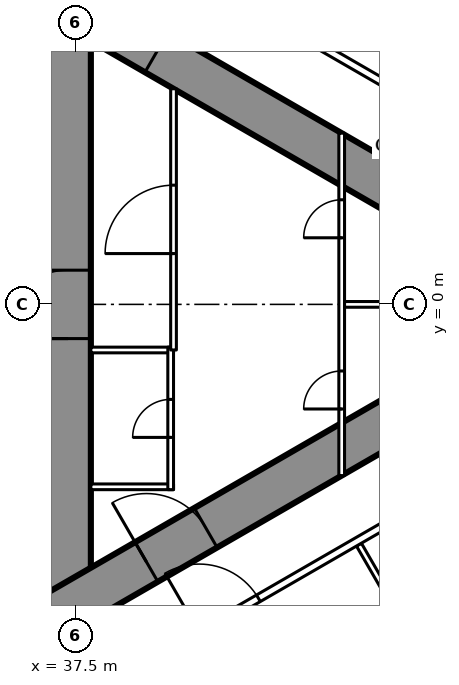
"""IFC4 building model, lengths in metres.
Left out: names, types, materials, properties, quantities, classifications, styles, units other than length and angle.
Written with IfcOpenShell. Run it as: python <this file> out.ifc"""

import sys

from ifc_helpers import new_model, si_unit, direction, frame, frame_2d, origin, place, context, subcontext, project, spatial, rectangle, extrude, element, fill, save


model = new_model("IFC4")
c1 = context("Model", 3, precision=1e-05, world=origin(), true_north=direction((0.0, 1.0)))
c2 = subcontext(c1, "Body", "Model", "MODEL_VIEW")
j1 = project(units=[si_unit("LENGTHUNIT", "METRE"), si_unit("PLANEANGLEUNIT", "RADIAN")], contexts=[c1])
p1 = place(None, origin())
s1 = spatial("IfcSite", under=j1, at=p1, CompositionType="ELEMENT")
p2 = place(p1, origin())
s2 = spatial("IfcBuilding", under=s1, at=p2, CompositionType="ELEMENT")
p3 = place(p2, frame((0.0, 0.0, 143.1)))
s3 = spatial("IfcBuildingStorey", under=s2, at=p3, CompositionType="ELEMENT", Elevation=143.1)
p4 = place(p3, frame((37.3, -8.6, 0.0), z_axis=(0.0, 0.0, 1.0), x_axis=(0.0, 1.0, 0.0)))
e1 = element("IfcWall", 1, at=p4, inside=s3, PredefinedType="SHEAR", context=c2, shape_type="SweptSolid", body=[
    extrude(rectangle(XDim=17.2, YDim=1.2, at=frame_2d((8.6, 0.0))), origin(), (0.0, 0.0, 1.0), 3.6),
])
p5 = place(p4, frame((7.7, 0.0, 0.0)))
e2 = element("IfcOpeningElement", 2, at=p5, cuts=e1, PredefinedType="OPENING", context=c2, shape_type="SweptSolid", body=[
    extrude(rectangle(XDim=1.8, YDim=2.2, at=frame_2d((0.9, 1.1))), frame((0.0, 0.61, 0.0), z_axis=(0.0, -1.0, 0.0), x_axis=(1.0, 0.0, 0.0)), (0.0, 0.0, 1.0), 1.22),
])
p6 = place(p3, frame((27.2, -13.8, 0.0), z_axis=(0.0, 0.0, 1.0), x_axis=(0.866027159892, 0.499996958321, 0.0)))
e3 = element("IfcWall", 3, at=p6, inside=s3, PredefinedType="SHEAR", context=c2, shape_type="SweptSolid", body=[
    extrude(rectangle(XDim=27.947, YDim=1.2, at=frame_2d((13.973, 0.0))), origin(), (0.0, 0.0, 1.0), 3.6),
])
p7 = place(p6, frame((4.6, 0.0, 0.0)))
e4 = element("IfcOpeningElement", 4, at=p7, cuts=e3, PredefinedType="OPENING", context=c2, shape_type="SweptSolid", body=[
    extrude(rectangle(XDim=1.0, YDim=2.2, at=frame_2d((0.5, 1.1))), frame((0.0, 0.61, 0.0), z_axis=(0.0, -1.0, 0.0), x_axis=(1.0, 0.0, 0.0)), (0.0, 0.0, 1.0), 1.22),
])
p8 = place(p6, frame((14.045, 0.0, 0.0)))
e5 = element("IfcOpeningElement", 5, at=p8, cuts=e3, PredefinedType="OPENING", context=c2, shape_type="SweptSolid", body=[
    extrude(rectangle(XDim=1.8, YDim=2.2, at=frame_2d((0.9, 1.1))), frame((0.0, 0.61, 0.0), z_axis=(0.0, -1.0, 0.0), x_axis=(1.0, 0.0, 0.0)), (0.0, 0.0, 1.0), 1.22),
])
p9 = place(p3, frame((27.2, 13.8, 0.0), z_axis=(0.0, 0.0, 1.0), x_axis=(0.866024515034, -0.500001539357, 0.0)))
e6 = element("IfcWall", 6, at=p9, inside=s3, PredefinedType="SHEAR", context=c2, shape_type="SweptSolid", body=[
    extrude(rectangle(XDim=26.907, YDim=1.2, at=frame_2d((13.454, 0.0))), origin(), (0.0, 0.0, 1.0), 3.6),
])
p10 = place(p9, frame((4.5, 0.0, 0.0)))
e7 = element("IfcOpeningElement", 7, at=p10, cuts=e6, PredefinedType="OPENING", context=c2, shape_type="SweptSolid", body=[
    extrude(rectangle(XDim=1.0, YDim=2.2, at=frame_2d((0.5, 1.1))), frame((0.0, 0.61, 0.0), z_axis=(0.0, -1.0, 0.0), x_axis=(1.0, 0.0, 0.0)), (0.0, 0.0, 1.0), 1.22),
])
p11 = place(p9, frame((12.545, 0.0, 0.0)))
e8 = element("IfcOpeningElement", 8, at=p11, cuts=e6, PredefinedType="OPENING", context=c2, shape_type="SweptSolid", body=[
    extrude(rectangle(XDim=1.8, YDim=2.2, at=frame_2d((0.9, 1.1))), frame((0.0, 0.61, 0.0), z_axis=(0.0, -1.0, 0.0), x_axis=(1.0, 0.0, 0.0)), (0.0, 0.0, 1.0), 1.22),
])
p12 = place(p3, frame((44.954, -6.321, 0.0), z_axis=(0.0, 0.0, 1.0), x_axis=(0.500018676722, -0.866014620505, 0.0)))
e9 = element("IfcWall", 9, at=p12, inside=s3, PredefinedType="PARTITIONING", context=c2, shape_type="SweptSolid", body=[
    extrude(rectangle(XDim=8.704, YDim=0.15, at=frame_2d((4.352, 0.0))), origin(), (0.0, 0.0, 1.0), 2.15),
])
p13 = place(p3, frame((37.96, -10.243, 0.0), z_axis=(0.0, 0.0, 1.0), x_axis=(0.866026429433, 0.499998223521, 0.0)))
e10 = element("IfcWall", 10, at=p13, inside=s3, PredefinedType="PARTITIONING", context=c2, shape_type="SweptSolid", body=[
    extrude(rectangle(XDim=20.487, YDim=0.2, at=frame_2d((10.243, 0.0))), origin(), (0.0, 0.0, 1.0), 3.35),
])
p14 = place(p13, frame((11.464, 0.0, 0.0)))
e11 = element("IfcOpeningElement", 11, at=p14, cuts=e10, PredefinedType="OPENING", context=c2, shape_type="SweptSolid", body=[
    extrude(rectangle(XDim=1.8, YDim=2.2, at=frame_2d((0.9, 1.1))), frame((0.0, 0.11, 0.0), z_axis=(0.0, -1.0, 0.0), x_axis=(1.0, 0.0, 0.0)), (0.0, 0.0, 1.0), 0.22),
])
p15 = place(p13, frame((17.586, 0.0, 0.0)))
e12 = element("IfcOpeningElement", 12, at=p15, cuts=e10, PredefinedType="OPENING", context=c2, shape_type="SweptSolid", body=[
    extrude(rectangle(XDim=1.8, YDim=2.14, at=frame_2d((0.9, 1.07))), frame((0.0, 0.11, 0.0), z_axis=(0.0, -1.0, 0.0), x_axis=(1.0, 0.0, 0.0)), (0.0, 0.0, 1.0), 0.22),
])
p16 = place(p13, frame((3.221, 0.0, 0.0)))
e13 = element("IfcOpeningElement", 13, at=p16, cuts=e10, PredefinedType="OPENING", context=c2, shape_type="SweptSolid", body=[
    extrude(rectangle(XDim=1.8, YDim=2.2, at=frame_2d((0.9, 1.1))), frame((0.0, 0.11, 0.0), z_axis=(0.0, -1.0, 0.0), x_axis=(1.0, 0.0, 0.0)), (0.0, 0.0, 1.0), 0.22),
])
p17 = place(p3, frame((36.834, 10.894, 0.0), z_axis=(0.0, 0.0, 1.0), x_axis=(0.866028157229, -0.499995230863, 0.0)))
e14 = element("IfcWall", 14, at=p17, inside=s3, PredefinedType="PARTITIONING", context=c2, shape_type="SweptSolid", body=[
    extrude(rectangle(XDim=21.667, YDim=0.2, at=frame_2d((10.833, 0.0))), origin(), (0.0, 0.0, 1.0), 3.35),
])
p18 = place(p17, frame((18.826, 0.0, 0.0)))
e15 = element("IfcOpeningElement", 15, at=p18, cuts=e14, PredefinedType="OPENING", context=c2, shape_type="SweptSolid", body=[
    extrude(rectangle(XDim=1.8, YDim=2.2, at=frame_2d((0.9, 1.1))), frame((0.0, 0.11, 0.0), z_axis=(0.0, -1.0, 0.0), x_axis=(1.0, 0.0, 0.0)), (0.0, 0.0, 1.0), 0.22),
])
p19 = place(p17, frame((14.938, 0.0, 0.0)))
e16 = element("IfcOpeningElement", 16, at=p19, cuts=e14, PredefinedType="OPENING", context=c2, shape_type="SweptSolid", body=[
    extrude(rectangle(XDim=1.8, YDim=2.2, at=frame_2d((0.9, 1.1))), frame((0.0, 0.11, 0.0), z_axis=(0.0, -1.0, 0.0), x_axis=(1.0, 0.0, 0.0)), (0.0, 0.0, 1.0), 0.22),
])
p20 = place(p17, frame((6.248, 0.0, 0.0)))
e17 = element("IfcOpeningElement", 17, at=p20, cuts=e14, PredefinedType="OPENING", context=c2, shape_type="SweptSolid", body=[
    extrude(rectangle(XDim=1.8, YDim=2.2, at=frame_2d((0.9, 1.1))), frame((0.0, 0.11, 0.0), z_axis=(0.0, -1.0, 0.0), x_axis=(1.0, 0.0, 0.0)), (0.0, 0.0, 1.0), 0.22),
])
for number, where, z_axis, x_axis in (
    (18, (37.9, -1.2, 0.0), (0.0, 0.0, 1.0), (1.0, 0.0, 0.0)),
    (19, (37.9, -4.8, 0.0), (0.0, 0.0, 1.0), (1.0, 0.0, 0.0)),
):
    element("IfcWall", number, at=place(p3, frame(where, z_axis=z_axis, x_axis=x_axis)), inside=s3, PredefinedType="PARTITIONING", context=c2, shape_type="SweptSolid", body=[
        extrude(rectangle(XDim=2.175, YDim=0.15, at=frame_2d((1.087, 0.0))), origin(), (0.0, 0.0, 1.0), 3.35),
    ])
p21 = place(p3, frame((40.0, -4.875, 0.0), z_axis=(0.0, 0.0, 1.0), x_axis=(0.0, 1.0, 0.0)))
e20 = element("IfcWall", 20, at=p21, inside=s3, PredefinedType="PARTITIONING", context=c2, shape_type="SweptSolid", body=[
    extrude(rectangle(XDim=3.75, YDim=0.15, at=frame_2d((1.875, 0.0))), origin(), (0.0, 0.0, 1.0), 3.35),
])
p22 = place(p21, frame((1.375, 0.0, 0.0)))
e21 = element("IfcOpeningElement", 21, at=p22, cuts=e20, PredefinedType="OPENING", context=c2, shape_type="SweptSolid", body=[
    extrude(rectangle(XDim=1.0, YDim=2.2, at=frame_2d((0.5, 1.1))), frame((0.0, 0.085, 0.0), z_axis=(0.0, -1.0, 0.0), x_axis=(1.0, 0.0, 0.0)), (0.0, 0.0, 1.0), 0.17),
])
p23 = place(p3, frame((40.075, -1.2, 0.0), z_axis=(0.0, 0.0, 1.0), x_axis=(0.0, 1.0, 0.0)))
e22 = element("IfcWall", 22, at=p23, inside=s3, PredefinedType="PARTITIONING", context=c2, shape_type="SweptSolid", body=[
    extrude(rectangle(XDim=6.874, YDim=0.15, at=frame_2d((3.437, 0.0))), origin(), (0.0, 0.0, 1.0), 3.35),
])
p24 = place(p23, frame((2.537, 0.0, 0.0)))
e23 = element("IfcOpeningElement", 23, at=p24, cuts=e22, PredefinedType="OPENING", context=c2, shape_type="SweptSolid", body=[
    extrude(rectangle(XDim=1.8, YDim=2.2, at=frame_2d((0.9, 1.1))), frame((0.0, 0.085, 0.0), z_axis=(0.0, -1.0, 0.0), x_axis=(1.0, 0.0, 0.0)), (0.0, 0.0, 1.0), 0.17),
])
p25 = place(p3, frame((44.5, -4.505, 0.0), z_axis=(0.0, 0.0, 1.0), x_axis=(0.0, 1.0, 0.0)))
e24 = element("IfcWall", 24, at=p25, inside=s3, PredefinedType="PARTITIONING", context=c2, shape_type="SweptSolid", body=[
    extrude(rectangle(XDim=9.009, YDim=0.15, at=frame_2d((4.505, 0.0))), origin(), (0.0, 0.0, 1.0), 3.35),
])
p26 = place(p25, frame((1.752, 0.0, 0.0)))
e25 = element("IfcOpeningElement", 25, at=p26, cuts=e24, PredefinedType="OPENING", context=c2, shape_type="SweptSolid", body=[
    extrude(rectangle(XDim=1.0, YDim=2.2, at=frame_2d((0.5, 1.1))), frame((0.0, 0.085, 0.0), z_axis=(0.0, -1.0, 0.0), x_axis=(1.0, 0.0, 0.0)), (0.0, 0.0, 1.0), 0.17),
])
p27 = place(p25, frame((6.257, 0.0, 0.0)))
e26 = element("IfcOpeningElement", 26, at=p27, cuts=e24, PredefinedType="OPENING", context=c2, shape_type="SweptSolid", body=[
    extrude(rectangle(XDim=1.0, YDim=2.2, at=frame_2d((0.5, 1.1))), frame((0.0, 0.085, 0.0), z_axis=(0.0, -1.0, 0.0), x_axis=(1.0, 0.0, 0.0)), (0.0, 0.0, 1.0), 0.17),
])
p28 = place(p3, frame((44.575, 0.0, 0.0), z_axis=(0.0, 0.0, 1.0), x_axis=(1.0, 0.0, 0.0)))
e27 = element("IfcWall", 27, at=p28, inside=s3, PredefinedType="PARTITIONING", context=c2, shape_type="SweptSolid", body=[
    extrude(rectangle(XDim=7.727, YDim=0.15, at=frame_2d((3.864, 0.0))), origin(), (0.0, 0.0, 1.0), 2.15),
])
p29 = place(p16, origin())
e28 = element("IfcDoor", 28, at=p29, inside=s3, OperationType="DOUBLE_DOOR_SINGLE_SWING", PredefinedType="DOOR", context=c2, shape_type="SweptSolid", body=[
    extrude(rectangle(XDim=1.8, YDim=2.2, at=frame_2d((0.9, 1.1))), frame((0.0, 0.025, 0.0), z_axis=(0.0, -1.0, 0.0), x_axis=(1.0, 0.0, 0.0)), (0.0, 0.0, 1.0), 0.05),
])
fill(e13, e28)
p30 = place(p22, origin())
e29 = element("IfcDoor", 29, at=p30, inside=s3, OperationType="SINGLE_SWING_LEFT", PredefinedType="DOOR", context=c2, shape_type="SweptSolid", body=[
    extrude(rectangle(XDim=1.0, YDim=2.2, at=frame_2d((0.5, 1.1))), frame((0.0, 0.025, 0.0), z_axis=(0.0, -1.0, 0.0), x_axis=(1.0, 0.0, 0.0)), (0.0, 0.0, 1.0), 0.05),
])
fill(e21, e29)
p31 = place(p24, origin())
e30 = element("IfcDoor", 30, at=p31, inside=s3, OperationType="DOUBLE_DOOR_SINGLE_SWING", PredefinedType="DOOR", context=c2, shape_type="SweptSolid", body=[
    extrude(rectangle(XDim=1.8, YDim=2.2, at=frame_2d((0.9, 1.1))), frame((0.0, 0.025, 0.0), z_axis=(0.0, -1.0, 0.0), x_axis=(1.0, 0.0, 0.0)), (0.0, 0.0, 1.0), 0.05),
])
fill(e23, e30)
p32 = place(p26, origin())
e31 = element("IfcDoor", 31, at=p32, inside=s3, OperationType="SINGLE_SWING_LEFT", PredefinedType="DOOR", context=c2, shape_type="SweptSolid", body=[
    extrude(rectangle(XDim=1.0, YDim=2.2, at=frame_2d((0.5, 1.1))), frame((0.0, 0.025, 0.0), z_axis=(0.0, -1.0, 0.0), x_axis=(1.0, 0.0, 0.0)), (0.0, 0.0, 1.0), 0.05),
])
fill(e25, e31)
p33 = place(p27, origin())
e32 = element("IfcDoor", 32, at=p33, inside=s3, OperationType="SINGLE_SWING_LEFT", PredefinedType="DOOR", context=c2, shape_type="SweptSolid", body=[
    extrude(rectangle(XDim=1.0, YDim=2.2, at=frame_2d((0.5, 1.1))), frame((0.0, 0.025, 0.0), z_axis=(0.0, -1.0, 0.0), x_axis=(1.0, 0.0, 0.0)), (0.0, 0.0, 1.0), 0.05),
])
fill(e26, e32)
p34 = place(p8, origin())
e33 = element("IfcDoor", 33, at=p34, inside=s3, OperationType="DOUBLE_DOOR_SINGLE_SWING", PredefinedType="DOOR", context=c2, shape_type="SweptSolid", body=[
    extrude(rectangle(XDim=1.8, YDim=2.2, at=frame_2d((0.9, 1.1))), frame((0.0, 0.025, 0.0), z_axis=(0.0, -1.0, 0.0), x_axis=(1.0, 0.0, 0.0)), (0.0, 0.0, 1.0), 0.05),
])
fill(e5, e33)
p35 = place(p11, origin())
e34 = element("IfcDoor", 34, at=p35, inside=s3, OperationType="DOUBLE_DOOR_SINGLE_SWING", PredefinedType="DOOR", context=c2, shape_type="SweptSolid", body=[
    extrude(rectangle(XDim=1.8, YDim=2.2, at=frame_2d((0.9, 1.1))), frame((0.0, 0.025, 0.0), z_axis=(0.0, -1.0, 0.0), x_axis=(1.0, 0.0, 0.0)), (0.0, 0.0, 1.0), 0.05),
])
fill(e8, e34)
p36 = place(p5, origin())
e35 = element("IfcDoor", 35, at=p36, inside=s3, OperationType="DOUBLE_DOOR_SINGLE_SWING", PredefinedType="DOOR", context=c2, shape_type="SweptSolid", body=[
    extrude(rectangle(XDim=1.8, YDim=2.2, at=frame_2d((0.9, 1.1))), frame((0.0, 0.025, 0.0), z_axis=(0.0, -1.0, 0.0), x_axis=(1.0, 0.0, 0.0)), (0.0, 0.0, 1.0), 0.05),
])
fill(e2, e35)
save(model, sys.argv[1])
